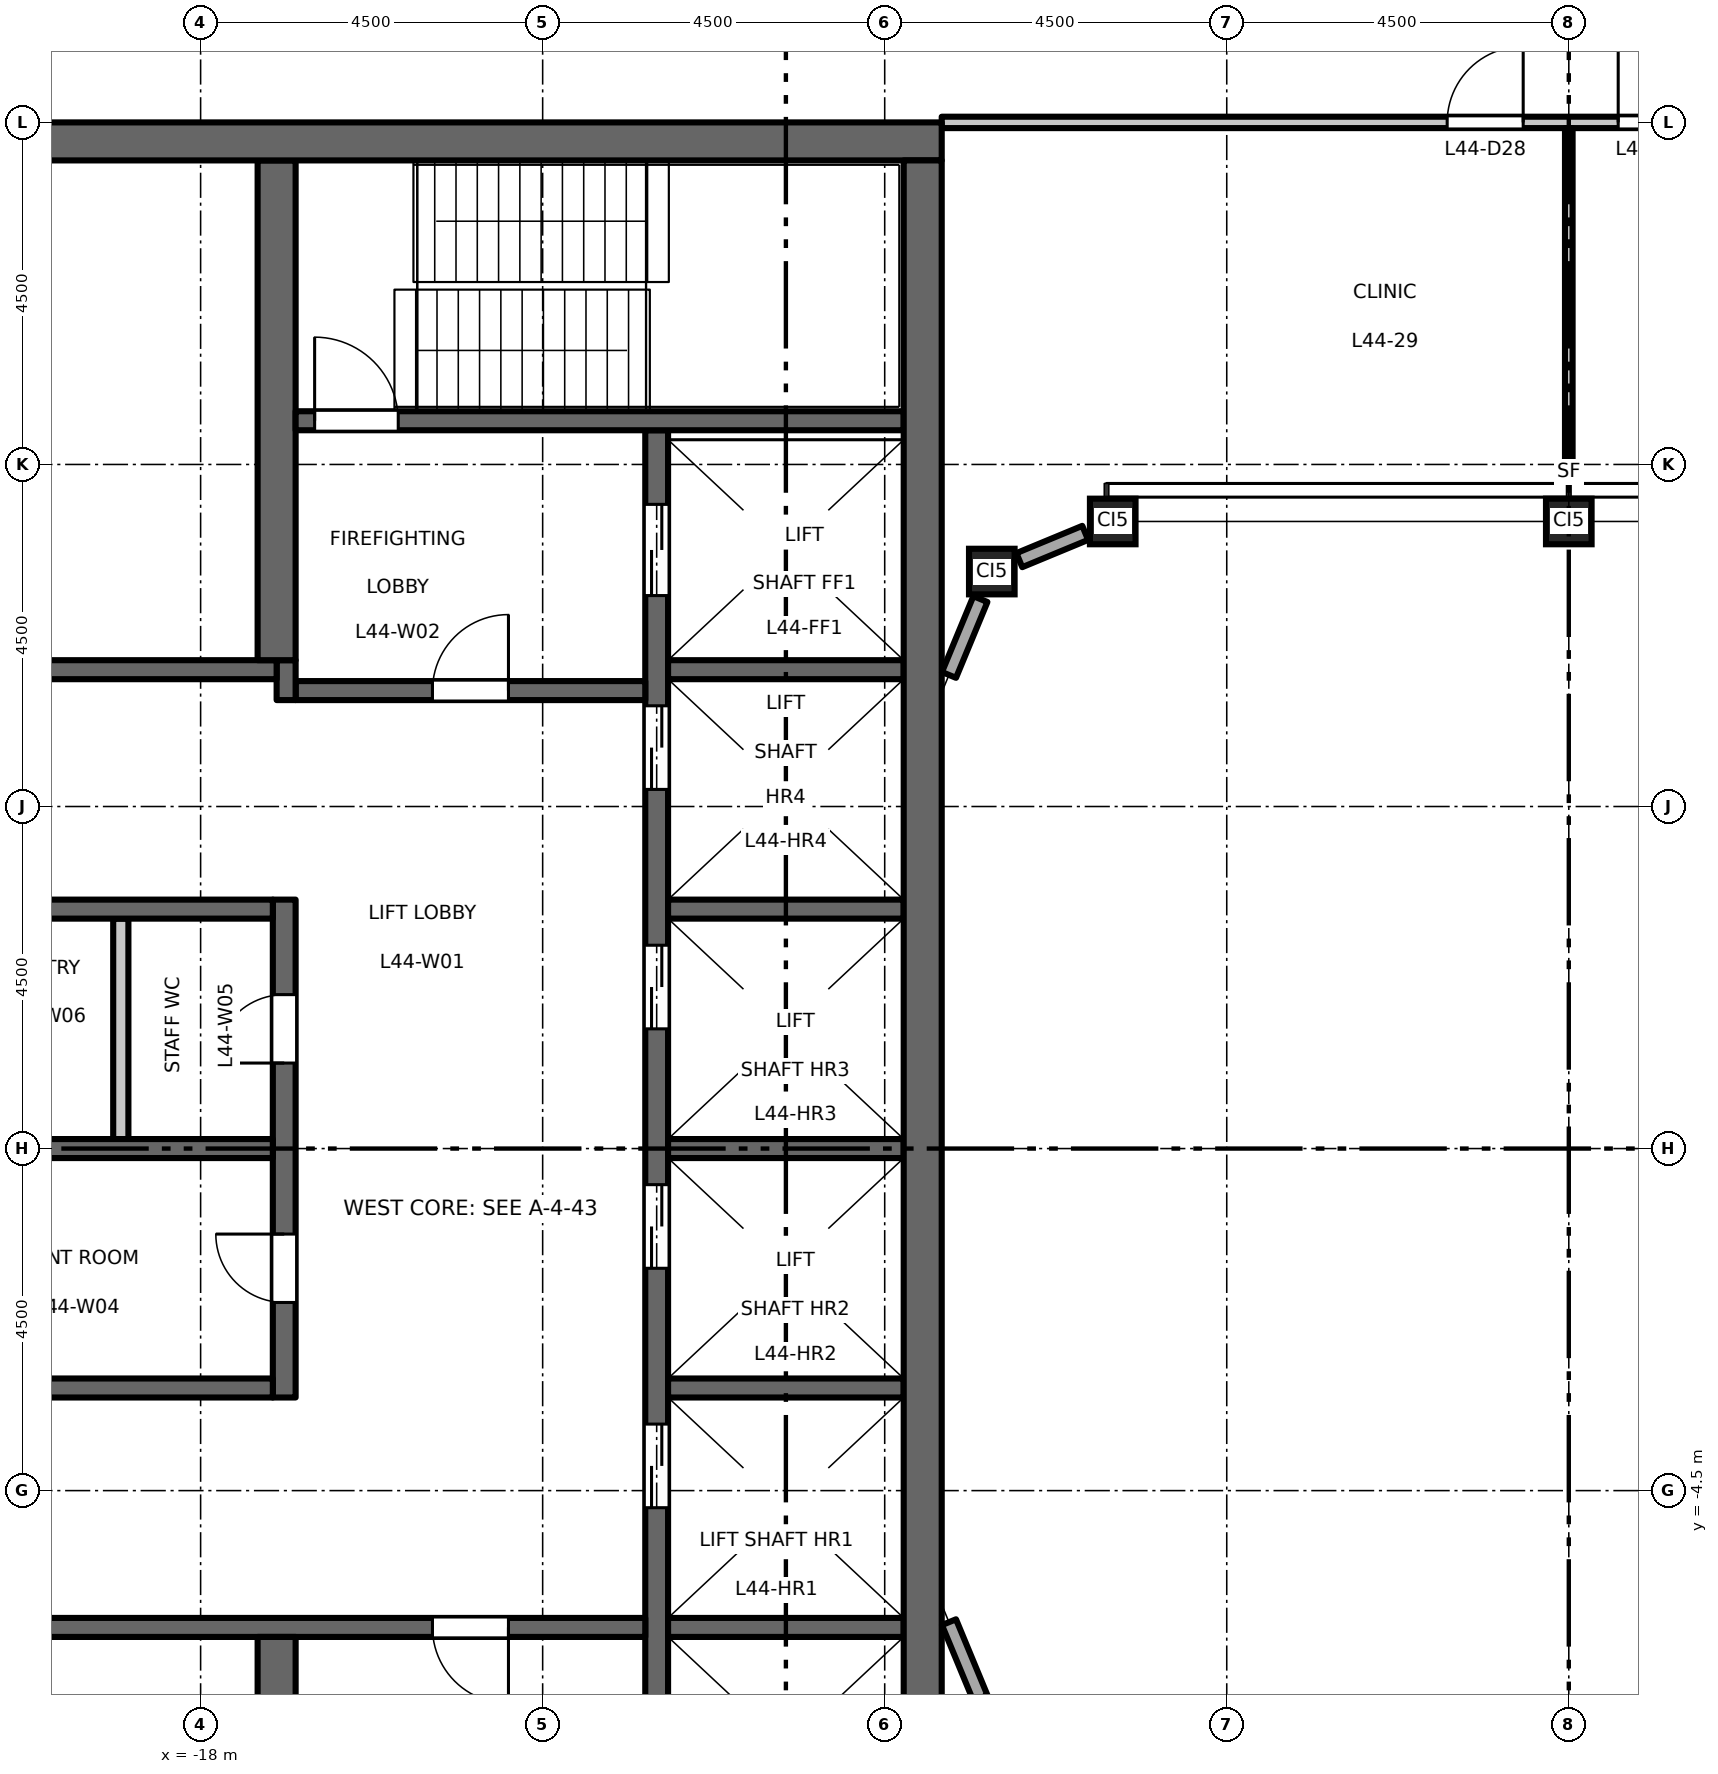
"""IFC4 building model, lengths in metres.
Left out: names, types, materials, properties, quantities, classifications, styles, units other than length and angle.
Written with IfcOpenShell. Run it as: python <this file> out.ifc"""

import sys

from ifc_helpers import new_model, si_unit, direction, frame, frame_2d, origin, origin_2d, place, context, subcontext, project, spatial, rectangle, hollow_rectangle, extrude, element, fill, save


model = new_model("IFC4")
c1 = context("Model", 3, precision=1e-05, world=origin(), true_north=direction((0.0, 1.0)))
c2 = subcontext(c1, "Body", "Model", "MODEL_VIEW")
j1 = project(units=[si_unit("LENGTHUNIT", "METRE"), si_unit("PLANEANGLEUNIT", "RADIAN")], contexts=[c1])
p1 = place(None, origin())
s1 = spatial("IfcSite", under=j1, at=p1, CompositionType="ELEMENT")
p2 = place(p1, origin())
s2 = spatial("IfcBuilding", under=s1, at=p2, CompositionType="ELEMENT")
p3 = place(p2, frame((0.0, 0.0, 206.2)))
s3 = spatial("IfcBuildingStorey", under=s2, at=p3, CompositionType="ELEMENT", Elevation=206.2)
for number, where, z_axis, x_axis in (
    (1, (-7.591, 7.591, 0.0), (0.0, 0.0, 1.0), (1.0, 0.0, 0.0)),
    (2, (-6.0, 8.25, 0.0), (0.0, 0.0, 1.0), (1.0, 0.0, 0.0)),
    (3, (0.0, 8.25, 0.0), (0.0, 0.0, 1.0), (1.0, 0.0, 0.0)),
):
    element("IfcColumn", number, at=place(p3, frame(where, z_axis=z_axis, x_axis=x_axis)), inside=s3, PredefinedType="COLUMN", context=c2, shape_type="SweptSolid", body=[
        extrude(hollow_rectangle(XDim=0.6, YDim=0.6, WallThickness=0.032, at=origin_2d()), origin(), (0.0, 0.0, 1.0), 4.5),
    ])
p4 = place(p3, frame((-12.0, -9.45, 0.0), z_axis=(0.0, 0.0, 1.0), x_axis=(0.0, 1.0, 0.0)))
e4 = element("IfcWall", 4, at=p4, inside=s3, PredefinedType="SHEAR", context=c2, shape_type="SweptSolid", body=[
    extrude(rectangle(XDim=18.9, YDim=0.3, at=frame_2d((9.45, 0.0))), origin(), (0.0, 0.0, 1.0), 4.35),
])
p5 = place(p4, frame((4.725, 0.0, 0.0)))
e5 = element("IfcOpeningElement", 5, at=p5, cuts=e4, PredefinedType="OPENING", context=c2, shape_type="SweptSolid", body=[
    extrude(rectangle(XDim=1.1, YDim=2.1, at=frame_2d((0.55, 1.05))), frame((0.0, 0.16, 0.0), z_axis=(0.0, -1.0, 0.0), x_axis=(1.0, 0.0, 0.0)), (0.0, 0.0, 1.0), 0.32),
])
p6 = place(p4, frame((7.875, 0.0, 0.0)))
e6 = element("IfcOpeningElement", 6, at=p6, cuts=e4, PredefinedType="OPENING", context=c2, shape_type="SweptSolid", body=[
    extrude(rectangle(XDim=1.1, YDim=2.1, at=frame_2d((0.55, 1.05))), frame((0.0, 0.16, 0.0), z_axis=(0.0, -1.0, 0.0), x_axis=(1.0, 0.0, 0.0)), (0.0, 0.0, 1.0), 0.32),
])
p7 = place(p4, frame((11.025, 0.0, 0.0)))
e7 = element("IfcOpeningElement", 7, at=p7, cuts=e4, PredefinedType="OPENING", context=c2, shape_type="SweptSolid", body=[
    extrude(rectangle(XDim=1.1, YDim=2.1, at=frame_2d((0.55, 1.05))), frame((0.0, 0.16, 0.0), z_axis=(0.0, -1.0, 0.0), x_axis=(1.0, 0.0, 0.0)), (0.0, 0.0, 1.0), 0.32),
])
p8 = place(p4, frame((14.175, 0.0, 0.0)))
e8 = element("IfcOpeningElement", 8, at=p8, cuts=e4, PredefinedType="OPENING", context=c2, shape_type="SweptSolid", body=[
    extrude(rectangle(XDim=1.1, YDim=2.1, at=frame_2d((0.55, 1.05))), frame((0.0, 0.16, 0.0), z_axis=(0.0, -1.0, 0.0), x_axis=(1.0, 0.0, 0.0)), (0.0, 0.0, 1.0), 0.32),
])
p9 = place(p4, frame((16.725, 0.0, 0.0)))
e9 = element("IfcOpeningElement", 9, at=p9, cuts=e4, PredefinedType="OPENING", context=c2, shape_type="SweptSolid", body=[
    extrude(rectangle(XDim=1.2, YDim=2.1, at=frame_2d((0.6, 1.05))), frame((0.0, 0.16, 0.0), z_axis=(0.0, -1.0, 0.0), x_axis=(1.0, 0.0, 0.0)), (0.0, 0.0, 1.0), 0.32),
])
p10 = place(p4, frame((0.975, 0.0, 0.0)))
e10 = element("IfcOpeningElement", 10, at=p10, cuts=e4, PredefinedType="OPENING", context=c2, shape_type="SweptSolid", body=[
    extrude(rectangle(XDim=1.2, YDim=2.1, at=frame_2d((0.6, 1.05))), frame((0.0, 0.16, 0.0), z_axis=(0.0, -1.0, 0.0), x_axis=(1.0, 0.0, 0.0)), (0.0, 0.0, 1.0), 0.32),
])
p11 = place(p3, frame((-12.15, 6.025, 0.0), z_axis=(0.0, 0.0, 1.0), x_axis=(-1.0, 0.0, 0.0)))
e11 = element("IfcWall", 11, at=p11, inside=s3, PredefinedType="SHEAR", context=c2, shape_type="SweptSolid", body=[
    extrude(rectangle(XDim=4.6, YDim=0.25, at=frame_2d((2.3, 0.0))), origin(), (0.0, 0.0, 1.0), 4.35),
])
p12 = place(p11, frame((1.8, 0.0, 0.0)))
e12 = element("IfcOpeningElement", 12, at=p12, cuts=e11, PredefinedType="OPENING", context=c2, shape_type="SweptSolid", body=[
    extrude(rectangle(XDim=1.0, YDim=2.1, at=frame_2d((0.5, 1.05))), frame((0.0, 0.135, 0.0), z_axis=(0.0, -1.0, 0.0), x_axis=(1.0, 0.0, 0.0)), (0.0, 0.0, 1.0), 0.27),
])
p13 = place(p3, frame((-16.875, 5.9, 0.0), z_axis=(0.0, 0.0, 1.0), x_axis=(0.0, 1.0, 0.0)))
e13 = element("IfcWall", 13, at=p13, inside=s3, PredefinedType="SHEAR", context=c2, shape_type="SweptSolid", body=[
    extrude(rectangle(XDim=0.525, YDim=0.25, at=frame_2d((0.263, 0.0))), origin(), (0.0, 0.0, 1.0), 4.35),
])
p14 = place(p3, frame((-17.0, 6.3, 0.0), z_axis=(0.0, 0.0, 1.0), x_axis=(-1.0, 0.0, 0.0)))
e14 = element("IfcWall", 14, at=p14, inside=s3, PredefinedType="SHEAR", context=c2, shape_type="SweptSolid", body=[
    extrude(rectangle(XDim=4.25, YDim=0.25, at=frame_2d((2.125, 0.0))), origin(), (0.0, 0.0, 1.0), 4.35),
])
p15 = place(p3, frame((-12.15, -6.3, 0.0), z_axis=(0.0, 0.0, 1.0), x_axis=(-1.0, 0.0, 0.0)))
e15 = element("IfcWall", 15, at=p15, inside=s3, PredefinedType="SHEAR", context=c2, shape_type="SweptSolid", body=[
    extrude(rectangle(XDim=9.1, YDim=0.25, at=frame_2d((4.55, 0.0))), origin(), (0.0, 0.0, 1.0), 4.35),
])
p16 = place(p15, frame((1.8, 0.0, 0.0)))
e16 = element("IfcOpeningElement", 16, at=p16, cuts=e15, PredefinedType="OPENING", context=c2, shape_type="SweptSolid", body=[
    extrude(rectangle(XDim=1.0, YDim=2.1, at=frame_2d((0.5, 1.05))), frame((0.0, 0.135, 0.0), z_axis=(0.0, -1.0, 0.0), x_axis=(1.0, 0.0, 0.0)), (0.0, 0.0, 1.0), 0.27),
])
p17 = place(p3, frame((-16.9, -3.275, 0.0), z_axis=(0.0, 0.0, 1.0), x_axis=(0.0, 1.0, 0.0)))
e17 = element("IfcWall", 17, at=p17, inside=s3, PredefinedType="SHEAR", context=c2, shape_type="SweptSolid", body=[
    extrude(rectangle(XDim=6.55, YDim=0.3, at=frame_2d((3.275, 0.0))), origin(), (0.0, 0.0, 1.0), 4.35),
])
p18 = place(p17, frame((1.25, 0.0, 0.0)))
e18 = element("IfcOpeningElement", 18, at=p18, cuts=e17, PredefinedType="OPENING", context=c2, shape_type="SweptSolid", body=[
    extrude(rectangle(XDim=0.9, YDim=2.1, at=frame_2d((0.45, 1.05))), frame((0.0, 0.16, 0.0), z_axis=(0.0, -1.0, 0.0), x_axis=(1.0, 0.0, 0.0)), (0.0, 0.0, 1.0), 0.32),
])
p19 = place(p17, frame((4.4, 0.0, 0.0)))
e19 = element("IfcOpeningElement", 19, at=p19, cuts=e17, PredefinedType="OPENING", context=c2, shape_type="SweptSolid", body=[
    extrude(rectangle(XDim=0.9, YDim=2.1, at=frame_2d((0.45, 1.05))), frame((0.0, 0.16, 0.0), z_axis=(0.0, -1.0, 0.0), x_axis=(1.0, 0.0, 0.0)), (0.0, 0.0, 1.0), 0.32),
])
for number, where, z_axis, x_axis in (
    (20, (-17.05, 0.0, 0.0), (0.0, 0.0, 1.0), (-1.0, 0.0, 0.0)),
    (21, (-17.05, 3.15, 0.0), (0.0, 0.0, 1.0), (-1.0, 0.0, 0.0)),
    (22, (-17.05, -3.15, 0.0), (0.0, 0.0, 1.0), (-1.0, 0.0, 0.0)),
):
    element("IfcWall", number, at=place(p3, frame(where, z_axis=z_axis, x_axis=x_axis)), inside=s3, PredefinedType="SHEAR", context=c2, shape_type="SweptSolid", body=[
        extrude(rectangle(XDim=4.2, YDim=0.25, at=frame_2d((2.1, 0.0))), origin(), (0.0, 0.0, 1.0), 4.35),
    ])
p20 = place(p3, frame((-19.05, 0.125, 0.0), z_axis=(0.0, 0.0, 1.0), x_axis=(0.0, 1.0, 0.0)))
e23 = element("IfcWall", 23, at=p20, inside=s3, PredefinedType="PARTITIONING", context=c2, shape_type="SweptSolid", body=[
    extrude(rectangle(XDim=2.9, YDim=0.2, at=frame_2d((1.45, 0.0))), origin(), (0.0, 0.0, 1.0), 4.35),
])
for number, where, z_axis, x_axis in (
    (24, (-17.0, 6.425, 0.0), (0.0, 0.0, 1.0), (0.0, 1.0, 0.0)),
    (25, (-17.0, -13.0, 0.0), (0.0, 0.0, 1.0), (0.0, 1.0, 0.0)),
):
    element("IfcWall", number, at=place(p3, frame(where, z_axis=z_axis, x_axis=x_axis)), inside=s3, PredefinedType="SHEAR", context=c2, shape_type="SweptSolid", body=[
        extrude(rectangle(XDim=6.575, YDim=0.5, at=frame_2d((3.288, 0.0))), origin(), (0.0, 0.0, 1.0), 4.35),
    ])
for number, where, z_axis, x_axis in (
    (26, (-8.75, 0.0, 0.0), (0.0, 0.0, 1.0), (-1.0, 0.0, 0.0)),
    (27, (-8.75, 3.15, 0.0), (0.0, 0.0, 1.0), (-1.0, 0.0, 0.0)),
    (28, (-8.75, 6.3, 0.0), (0.0, 0.0, 1.0), (-1.0, 0.0, 0.0)),
    (29, (-8.75, -3.15, 0.0), (0.0, 0.0, 1.0), (-1.0, 0.0, 0.0)),
    (30, (-8.75, -6.3, 0.0), (0.0, 0.0, 1.0), (-1.0, 0.0, 0.0)),
):
    element("IfcWall", number, at=place(p3, frame(where, z_axis=z_axis, x_axis=x_axis)), inside=s3, PredefinedType="SHEAR", context=c2, shape_type="SweptSolid", body=[
        extrude(rectangle(XDim=3.1, YDim=0.25, at=frame_2d((1.55, 0.0))), origin(), (0.0, 0.0, 1.0), 4.35),
    ])
p21 = place(p3, frame((-8.75, 9.575, 0.0), z_axis=(0.0, 0.0, 1.0), x_axis=(-1.0, 0.0, 0.0)))
e31 = element("IfcWall", 31, at=p21, inside=s3, PredefinedType="SHEAR", context=c2, shape_type="SweptSolid", body=[
    extrude(rectangle(XDim=8.0, YDim=0.25, at=frame_2d((4.0, 0.0))), origin(), (0.0, 0.0, 1.0), 4.35),
])
p22 = place(p21, frame((6.65, 0.0, 0.0)))
e32 = element("IfcOpeningElement", 32, at=p22, cuts=e31, PredefinedType="OPENING", context=c2, shape_type="SweptSolid", body=[
    extrude(rectangle(XDim=1.1, YDim=2.1, at=frame_2d((0.55, 1.05))), frame((0.0, 0.135, 0.0), z_axis=(0.0, -1.0, 0.0), x_axis=(1.0, 0.0, 0.0)), (0.0, 0.0, 1.0), 0.27),
])
p23 = place(p3, frame((-8.25, 13.25, 0.0), z_axis=(0.0, 0.0, 1.0), x_axis=(-1.0, 0.0, 0.0)))
e33 = element("IfcWall", 33, at=p23, inside=s3, PredefinedType="SHEAR", context=c2, shape_type="SweptSolid", body=[
    extrude(rectangle(XDim=13.5, YDim=0.5, at=frame_2d((6.75, 0.0))), origin(), (0.0, 0.0, 1.0), 4.35),
])
p24 = place(p3, frame((-8.5, -13.0, 0.0), z_axis=(0.0, 0.0, 1.0), x_axis=(0.0, 1.0, 0.0)))
e34 = element("IfcWall", 34, at=p24, inside=s3, PredefinedType="SHEAR", context=c2, shape_type="SweptSolid", body=[
    extrude(rectangle(XDim=26.0, YDim=0.5, at=frame_2d((13.0, 0.0))), origin(), (0.0, 0.0, 1.0), 4.35),
])
p25 = place(p3, frame((-6.362, 8.1, 0.0), z_axis=(0.0, 0.0, 1.0), x_axis=(-0.923829670615, -0.382803787458, 0.0)))
e35 = element("IfcWall", 35, at=p25, inside=s3, PredefinedType="STANDARD", context=c2, shape_type="SweptSolid", body=[
    extrude(rectangle(XDim=0.938, YDim=0.2, at=frame_2d((0.469, 0.0))), origin(), (0.0, 0.0, 1.0), 3.918),
])
for number, where, z_axis, x_axis in (
    (36, (-7.741, 7.229, 0.0), (0.0, 0.0, 1.0), (-0.383, -0.924, 0.0)),
    (37, (-8.154, -6.231, 0.0), (0.0, 0.0, 1.0), (0.383, -0.924, 0.0)),
):
    element("IfcWall", number, at=place(p3, frame(where, z_axis=z_axis, x_axis=x_axis)), inside=s3, PredefinedType="STANDARD", context=c2, shape_type="SweptSolid", body=[
        extrude(rectangle(XDim=1.08, YDim=0.2, at=frame_2d((0.54, 0.0))), origin(), (0.0, 0.0, 1.0), 3.918),
    ])
p26 = place(p3, frame((-8.25, 13.5, 0.0), z_axis=(0.0, 0.0, 1.0), x_axis=(1.0, 0.0, 0.0)))
e38 = element("IfcWall", 38, at=p26, inside=s3, PredefinedType="PARTITIONING", context=c2, shape_type="SweptSolid", body=[
    extrude(rectangle(XDim=16.5, YDim=0.15, at=frame_2d((8.25, 0.0))), origin(), (0.0, 0.0, 1.0), 4.35),
])
p27 = place(p26, frame((6.65, 0.0, 0.0)))
e39 = element("IfcOpeningElement", 39, at=p27, cuts=e38, PredefinedType="OPENING", context=c2, shape_type="SweptSolid", body=[
    extrude(rectangle(XDim=1.0, YDim=2.1, at=frame_2d((0.5, 1.05))), frame((0.0, 0.085, 0.0), z_axis=(0.0, -1.0, 0.0), x_axis=(1.0, 0.0, 0.0)), (0.0, 0.0, 1.0), 0.17),
])
p28 = place(p26, frame((8.9, 0.0, 0.0)))
e40 = element("IfcOpeningElement", 40, at=p28, cuts=e38, PredefinedType="OPENING", context=c2, shape_type="SweptSolid", body=[
    extrude(rectangle(XDim=1.0, YDim=2.1, at=frame_2d((0.5, 1.05))), frame((0.0, 0.085, 0.0), z_axis=(0.0, -1.0, 0.0), x_axis=(1.0, 0.0, 0.0)), (0.0, 0.0, 1.0), 0.17),
])
p29 = place(p3, frame((0.0, 8.6, 0.0), z_axis=(0.0, 0.0, 1.0), x_axis=(0.0, 1.0, 0.0)))
e41 = element("IfcWall", 41, at=p29, inside=s3, PredefinedType="PARTITIONING", context=c2, shape_type="SweptSolid", body=[
    extrude(rectangle(XDim=4.825, YDim=0.1, at=frame_2d((2.413, 0.0))), origin(), (0.0, 0.0, 1.0), 3.55),
])
p30 = place(p12, origin())
e42 = element("IfcDoor", 42, at=p30, inside=s3, OperationType="SINGLE_SWING_LEFT", PredefinedType="DOOR", context=c2, shape_type="SweptSolid", body=[
    extrude(rectangle(XDim=1.0, YDim=2.1, at=frame_2d((0.5, 1.05))), frame((0.0, 0.025, 0.0), z_axis=(0.0, -1.0, 0.0), x_axis=(1.0, 0.0, 0.0)), (0.0, 0.0, 1.0), 0.05),
])
fill(e12, e42)
p31 = place(p16, origin())
e43 = element("IfcDoor", 43, at=p31, inside=s3, OperationType="SINGLE_SWING_RIGHT", PredefinedType="DOOR", context=c2, shape_type="SweptSolid", body=[
    extrude(rectangle(XDim=1.0, YDim=2.1, at=frame_2d((0.5, 1.05))), frame((0.0, 0.025, 0.0), z_axis=(0.0, -1.0, 0.0), x_axis=(1.0, 0.0, 0.0)), (0.0, 0.0, 1.0), 0.05),
])
fill(e16, e43)
p32 = place(p22, origin())
e44 = element("IfcDoor", 44, at=p32, inside=s3, OperationType="SINGLE_SWING_RIGHT", PredefinedType="DOOR", context=c2, shape_type="SweptSolid", body=[
    extrude(rectangle(XDim=1.1, YDim=2.1, at=frame_2d((0.55, 1.05))), frame((0.0, 0.025, 0.0), z_axis=(0.0, -1.0, 0.0), x_axis=(1.0, 0.0, 0.0)), (0.0, 0.0, 1.0), 0.05),
])
fill(e32, e44)
p33 = place(p5, origin())
e45 = element("IfcDoor", 45, at=p33, inside=s3, OperationType="DOUBLE_DOOR_SLIDING", PredefinedType="DOOR", context=c2, shape_type="SweptSolid", body=[
    extrude(rectangle(XDim=1.1, YDim=2.1, at=frame_2d((0.55, 1.05))), frame((0.0, 0.025, 0.0), z_axis=(0.0, -1.0, 0.0), x_axis=(1.0, 0.0, 0.0)), (0.0, 0.0, 1.0), 0.05),
])
fill(e5, e45)
p34 = place(p6, origin())
e46 = element("IfcDoor", 46, at=p34, inside=s3, OperationType="DOUBLE_DOOR_SLIDING", PredefinedType="DOOR", context=c2, shape_type="SweptSolid", body=[
    extrude(rectangle(XDim=1.1, YDim=2.1, at=frame_2d((0.55, 1.05))), frame((0.0, 0.025, 0.0), z_axis=(0.0, -1.0, 0.0), x_axis=(1.0, 0.0, 0.0)), (0.0, 0.0, 1.0), 0.05),
])
fill(e6, e46)
p35 = place(p7, origin())
e47 = element("IfcDoor", 47, at=p35, inside=s3, OperationType="DOUBLE_DOOR_SLIDING", PredefinedType="DOOR", context=c2, shape_type="SweptSolid", body=[
    extrude(rectangle(XDim=1.1, YDim=2.1, at=frame_2d((0.55, 1.05))), frame((0.0, 0.025, 0.0), z_axis=(0.0, -1.0, 0.0), x_axis=(1.0, 0.0, 0.0)), (0.0, 0.0, 1.0), 0.05),
])
fill(e7, e47)
p36 = place(p8, origin())
e48 = element("IfcDoor", 48, at=p36, inside=s3, OperationType="DOUBLE_DOOR_SLIDING", PredefinedType="DOOR", context=c2, shape_type="SweptSolid", body=[
    extrude(rectangle(XDim=1.1, YDim=2.1, at=frame_2d((0.55, 1.05))), frame((0.0, 0.025, 0.0), z_axis=(0.0, -1.0, 0.0), x_axis=(1.0, 0.0, 0.0)), (0.0, 0.0, 1.0), 0.05),
])
fill(e8, e48)
p37 = place(p9, origin())
e49 = element("IfcDoor", 49, at=p37, inside=s3, OperationType="DOUBLE_DOOR_SLIDING", PredefinedType="DOOR", context=c2, shape_type="SweptSolid", body=[
    extrude(rectangle(XDim=1.2, YDim=2.1, at=frame_2d((0.6, 1.05))), frame((0.0, 0.025, 0.0), z_axis=(0.0, -1.0, 0.0), x_axis=(1.0, 0.0, 0.0)), (0.0, 0.0, 1.0), 0.05),
])
fill(e9, e49)
p38 = place(p18, origin())
e50 = element("IfcDoor", 50, at=p38, inside=s3, OperationType="SINGLE_SWING_LEFT", PredefinedType="DOOR", context=c2, shape_type="SweptSolid", body=[
    extrude(rectangle(XDim=0.9, YDim=2.1, at=frame_2d((0.45, 1.05))), frame((0.0, 0.025, 0.0), z_axis=(0.0, -1.0, 0.0), x_axis=(1.0, 0.0, 0.0)), (0.0, 0.0, 1.0), 0.05),
])
fill(e18, e50)
p39 = place(p19, origin())
e51 = element("IfcDoor", 51, at=p39, inside=s3, OperationType="SINGLE_SWING_RIGHT", PredefinedType="DOOR", context=c2, shape_type="SweptSolid", body=[
    extrude(rectangle(XDim=0.9, YDim=2.1, at=frame_2d((0.45, 1.05))), frame((0.0, 0.025, 0.0), z_axis=(0.0, -1.0, 0.0), x_axis=(1.0, 0.0, 0.0)), (0.0, 0.0, 1.0), 0.05),
])
fill(e19, e51)
p40 = place(p27, origin())
e52 = element("IfcDoor", 52, at=p40, inside=s3, OperationType="SINGLE_SWING_RIGHT", PredefinedType="DOOR", context=c2, shape_type="SweptSolid", body=[
    extrude(rectangle(XDim=1.0, YDim=2.1, at=frame_2d((0.5, 1.05))), frame((0.0, 0.025, 0.0), z_axis=(0.0, -1.0, 0.0), x_axis=(1.0, 0.0, 0.0)), (0.0, 0.0, 1.0), 0.05),
])
fill(e39, e52)
p41 = place(p28, origin())
e53 = element("IfcDoor", 53, at=p41, inside=s3, OperationType="SINGLE_SWING_LEFT", PredefinedType="DOOR", context=c2, shape_type="SweptSolid", body=[
    extrude(rectangle(XDim=1.0, YDim=2.1, at=frame_2d((0.5, 1.05))), frame((0.0, 0.025, 0.0), z_axis=(0.0, -1.0, 0.0), x_axis=(1.0, 0.0, 0.0)), (0.0, 0.0, 1.0), 0.05),
])
fill(e40, e53)
save(model, sys.argv[1])
